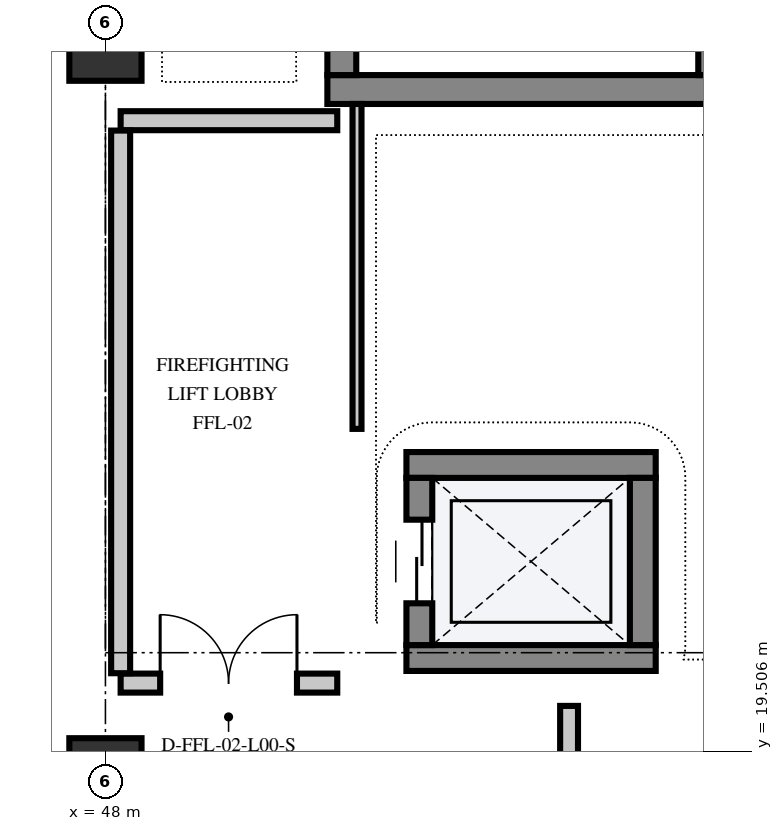
"""IFC4 building model, lengths in metres.
Left out: names, types, materials, properties, quantities, classifications, styles, units other than length and angle.
Written with IfcOpenShell. Run it as: python <this file> out.ifc"""

import sys

from ifc_helpers import new_model, si_unit, direction, frame, frame_2d, origin, origin_2d, place, context, subcontext, project, spatial, rectangle, extrude, element, fill, save


model = new_model("IFC4")
c1 = context("Model", 3, precision=1e-05, world=origin(), true_north=direction((0.0, 1.0)))
c2 = subcontext(c1, "Body", "Model", "MODEL_VIEW")
j1 = project(units=[si_unit("LENGTHUNIT", "METRE"), si_unit("PLANEANGLEUNIT", "RADIAN")], contexts=[c1])
p1 = place(None, origin())
s1 = spatial("IfcSite", under=j1, at=p1, CompositionType="ELEMENT")
p2 = place(p1, origin())
s2 = spatial("IfcBuilding", under=s1, at=p2, CompositionType="ELEMENT")
p3 = place(p2, origin())
s3 = spatial("IfcBuildingStorey", under=s2, at=p3, CompositionType="ELEMENT", Elevation=0.0)
for number, where, z_axis, x_axis in (
    (1, (48.0, 19.2, 0.0), (0.0, 0.0, 1.0), (1.0, 0.0, 0.0)),
    (2, (48.0, 28.8, 0.0), (0.0, 0.0, 1.0), (1.0, 0.0, 0.0)),
):
    element("IfcColumn", number, at=place(p3, frame(where, z_axis=z_axis, x_axis=x_axis)), inside=s3, PredefinedType="COLUMN", context=c2, shape_type="SweptSolid", body=[
        extrude(rectangle(XDim=0.95, YDim=0.95, at=origin_2d()), origin(), (0.0, 0.0, 1.0), 5.4),
    ])
p4 = place(p3, frame((50.92, 28.21, 0.0), z_axis=(0.0, 0.0, 1.0), x_axis=(1.0, 0.0, 0.0)))
e3 = element("IfcWall", 3, at=p4, inside=s3, PredefinedType="SHEAR", context=c2, shape_type="SweptSolid", body=[
    extrude(rectangle(XDim=5.26, YDim=0.38, at=frame_2d((2.63, 0.0))), origin(), (0.0, 0.0, 1.0), 5.09),
])
p5 = place(p3, frame((55.99, 28.4, 0.0), z_axis=(0.0, 0.0, 1.0), x_axis=(0.0, 1.0, 0.0)))
e4 = element("IfcWall", 4, at=p5, inside=s3, PredefinedType="SHEAR", context=c2, shape_type="SweptSolid", body=[
    extrude(rectangle(XDim=8.8, YDim=0.38, at=frame_2d((4.4, 0.0))), origin(), (0.0, 0.0, 1.0), 5.09),
])
p6 = place(p3, frame((51.11, 28.4, 0.0), z_axis=(0.0, 0.0, 1.0), x_axis=(0.0, 1.0, 0.0)))
e5 = element("IfcWall", 5, at=p6, inside=s3, PredefinedType="SHEAR", context=c2, shape_type="SweptSolid", body=[
    extrude(rectangle(XDim=8.8, YDim=0.38, at=frame_2d((4.4, 0.0))), origin(), (0.0, 0.0, 1.0), 5.09),
])
p7 = place(p6, frame((0.45, 0.0, 0.0)))
e6 = element("IfcOpeningElement", 6, at=p7, cuts=e5, PredefinedType="OPENING", context=c2, shape_type="SweptSolid", body=[
    extrude(rectangle(XDim=1.35, YDim=2.2, at=frame_2d((0.675, 1.1))), frame((0.0, 0.202, 0.0), z_axis=(0.0, -1.0, 0.0), x_axis=(1.0, 0.0, 0.0)), (0.0, 0.0, 1.0), 0.404),
])
for number, where, z_axis, x_axis in (
    (7, (51.96, 20.73, 0.0), (0.0, 0.0, 1.0), (1.0, 0.0, 0.0)),
    (8, (51.96, 23.27, 0.0), (0.0, 0.0, 1.0), (1.0, 0.0, 0.0)),
):
    element("IfcWall", number, at=place(p3, frame(where, z_axis=z_axis, x_axis=x_axis)), inside=s3, PredefinedType="SHEAR", context=c2, shape_type="SweptSolid", body=[
        extrude(rectangle(XDim=3.28, YDim=0.34, at=frame_2d((1.64, 0.0))), origin(), (0.0, 0.0, 1.0), 5.09),
    ])
p8 = place(p3, frame((52.13, 20.9, 0.0), z_axis=(0.0, 0.0, 1.0), x_axis=(0.0, 1.0, 0.0)))
e9 = element("IfcWall", 9, at=p8, inside=s3, PredefinedType="SHEAR", context=c2, shape_type="SweptSolid", body=[
    extrude(rectangle(XDim=2.2, YDim=0.34, at=frame_2d((1.1, 0.0))), origin(), (0.0, 0.0, 1.0), 5.09),
])
p9 = place(p8, frame((0.55, 0.0, 0.0)))
e10 = element("IfcOpeningElement", 10, at=p9, cuts=e9, PredefinedType="OPENING", context=c2, shape_type="SweptSolid", body=[
    extrude(rectangle(XDim=1.1, YDim=2.15, at=frame_2d((0.55, 1.075))), frame((0.0, 0.182, 0.0), z_axis=(0.0, -1.0, 0.0), x_axis=(1.0, 0.0, 0.0)), (0.0, 0.0, 1.0), 0.364),
])
p10 = place(p3, frame((55.07, 20.9, 0.0), z_axis=(0.0, 0.0, 1.0), x_axis=(0.0, 1.0, 0.0)))
e11 = element("IfcWall", 11, at=p10, inside=s3, PredefinedType="SHEAR", context=c2, shape_type="SweptSolid", body=[
    extrude(rectangle(XDim=2.2, YDim=0.34, at=frame_2d((1.1, 0.0))), origin(), (0.0, 0.0, 1.0), 5.09),
])
p11 = place(p3, frame((48.2, 20.4, 0.0), z_axis=(0.0, 0.0, 1.0), x_axis=(1.0, 0.0, 0.0)))
e12 = element("IfcWall", 12, at=p11, inside=s3, PredefinedType="PARTITIONING", context=c2, shape_type="SweptSolid", body=[
    extrude(rectangle(XDim=2.85, YDim=0.25, at=frame_2d((1.425, 0.0))), origin(), (0.0, 0.0, 1.0), 4.03),
])
p12 = place(p11, frame((0.52, 0.0, 0.0)))
e13 = element("IfcOpeningElement", 13, at=p12, cuts=e12, PredefinedType="OPENING", context=c2, shape_type="SweptSolid", body=[
    extrude(rectangle(XDim=1.8, YDim=2.25, at=frame_2d((0.9, 1.125))), frame((0.0, 0.137, 0.0), z_axis=(0.0, -1.0, 0.0), x_axis=(1.0, 0.0, 0.0)), (0.0, 0.0, 1.0), 0.274),
])
p13 = place(p3, frame((48.2, 27.8, 0.0), z_axis=(0.0, 0.0, 1.0), x_axis=(1.0, 0.0, 0.0)))
e14 = element("IfcWall", 14, at=p13, inside=s3, PredefinedType="PARTITIONING", context=c2, shape_type="SweptSolid", body=[
    extrude(rectangle(XDim=2.85, YDim=0.25, at=frame_2d((1.425, 0.0))), origin(), (0.0, 0.0, 1.0), 4.03),
])
p14 = place(p3, frame((48.2, 20.53, 0.0), z_axis=(0.0, 0.0, 1.0), x_axis=(0.0, 1.0, 0.0)))
e15 = element("IfcWall", 15, at=p14, inside=s3, PredefinedType="PARTITIONING", context=c2, shape_type="SweptSolid", body=[
    extrude(rectangle(XDim=7.14, YDim=0.25, at=frame_2d((3.57, 0.0))), origin(), (0.0, 0.0, 1.0), 4.03),
])
p15 = place(p3, frame((54.1, 0.35, 0.0), z_axis=(0.0, 0.0, 1.0), x_axis=(0.0, 1.0, 0.0)))
e16 = element("IfcWall", 16, at=p15, inside=s3, PredefinedType="PARTITIONING", context=c2, shape_type="SweptSolid", body=[
    extrude(rectangle(XDim=19.75, YDim=0.235, at=frame_2d((9.875, 0.0))), origin(), (0.0, 0.0, 1.0), 4.03),
])
p16 = place(p15, frame((9.415, 0.0, 0.0)))
e17 = element("IfcOpeningElement", 17, at=p16, cuts=e16, PredefinedType="OPENING", context=c2, shape_type="SweptSolid", body=[
    extrude(rectangle(XDim=0.92, YDim=2.1, at=frame_2d((0.46, 1.05))), frame((0.0, 0.129, 0.0), z_axis=(0.0, -1.0, 0.0), x_axis=(1.0, 0.0, 0.0)), (0.0, 0.0, 1.0), 0.259),
])
p17 = place(p3, frame((51.31, 23.745, 0.0), z_axis=(0.0, 0.0, 1.0), x_axis=(0.0, 1.0, 0.0)))
e18 = element("IfcWall", 18, at=p17, inside=s3, PredefinedType="PARTITIONING", context=c2, shape_type="SweptSolid", body=[
    extrude(rectangle(XDim=4.275, YDim=0.118, at=frame_2d((2.138, 0.0))), origin(), (0.0, 0.0, 1.0), 5.09),
])
p18 = place(p9, origin())
e19 = element("IfcDoor", 19, at=p18, inside=s3, OperationType="DOUBLE_DOOR_SLIDING", PredefinedType="DOOR", context=c2, shape_type="SweptSolid", body=[
    extrude(rectangle(XDim=1.1, YDim=2.15, at=frame_2d((0.55, 1.075))), frame((0.0, 0.025, 0.0), z_axis=(0.0, -1.0, 0.0), x_axis=(1.0, 0.0, 0.0)), (0.0, 0.0, 1.0), 0.05),
])
fill(e10, e19)
p19 = place(p12, origin())
e20 = element("IfcDoor", 20, at=p19, inside=s3, OperationType="DOUBLE_DOOR_SINGLE_SWING", PredefinedType="DOOR", context=c2, shape_type="SweptSolid", body=[
    extrude(rectangle(XDim=1.8, YDim=2.25, at=frame_2d((0.9, 1.125))), frame((0.0, 0.025, 0.0), z_axis=(0.0, -1.0, 0.0), x_axis=(1.0, 0.0, 0.0)), (0.0, 0.0, 1.0), 0.05),
])
fill(e13, e20)
save(model, sys.argv[1])
